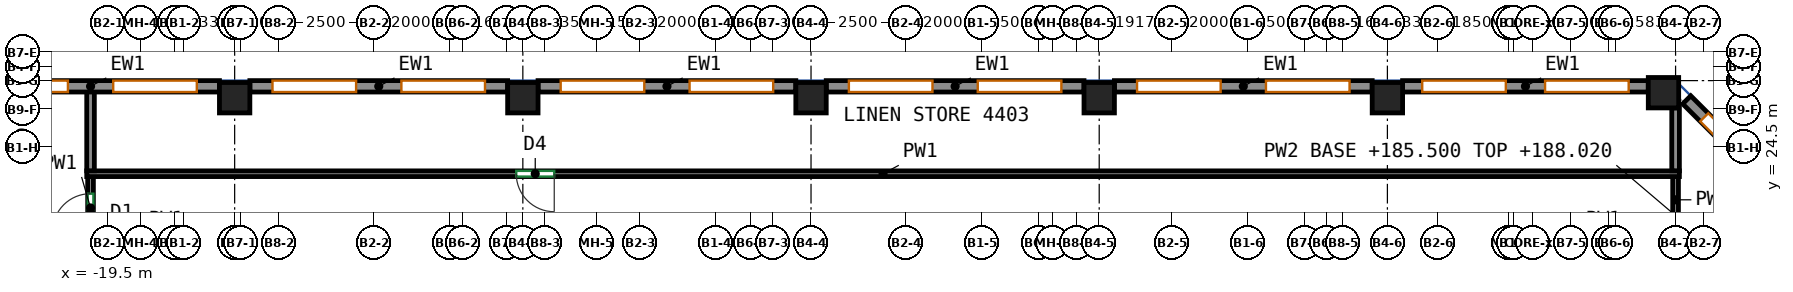
"""IFC4 building model, lengths in metres.
Left out: names, types, materials, properties, quantities, classifications, styles, units other than length and angle.
Written with IfcOpenShell. Run it as: python <this file> out.ifc"""

import sys

from ifc_helpers import new_model, si_unit, direction, frame, frame_2d, origin, origin_2d, place, context, subcontext, project, spatial, rectangle, extrude, source, transform, mapped, element, fill, save


model = new_model("IFC4")
c1 = context("Model", 3, precision=1e-05, world=origin(), true_north=direction((0.0, 1.0)))
c2 = subcontext(c1, "Body", "Model", "MODEL_VIEW")
j1 = project(units=[si_unit("LENGTHUNIT", "METRE"), si_unit("PLANEANGLEUNIT", "RADIAN")], contexts=[c1])
p1 = place(None, origin())
s1 = spatial("IfcSite", under=j1, at=p1, CompositionType="ELEMENT")
p2 = place(p1, origin())
s2 = spatial("IfcBuilding", under=s1, at=p2, CompositionType="ELEMENT")
p3 = place(p2, frame((0.0, 0.0, 185.5)))
s3 = spatial("IfcBuildingStorey", under=s2, at=p3, CompositionType="ELEMENT", Elevation=185.5)
m1 = source(origin(), c2, "Body", "SweptSolid", [
    extrude(rectangle(XDim=0.8, YDim=0.8, at=origin_2d()), origin(), (0.0, 0.0, 1.0), 3.12),
])
for number, where, z_axis, x_axis in (
    (1, (-16.167, 25.8, 0.0), (0.0, 0.0, 1.0), (1.0, 0.0, 0.0)),
    (2, (-8.583, 25.8, 0.0), (0.0, 0.0, 1.0), (1.0, 0.0, 0.0)),
    (3, (-1.0, 25.8, 0.0), (0.0, 0.0, 1.0), (1.0, 0.0, 0.0)),
    (4, (6.583, 25.8, 0.0), (0.0, 0.0, 1.0), (1.0, 0.0, 0.0)),
    (5, (14.167, 25.8, 0.0), (0.0, 0.0, 1.0), (1.0, 0.0, 0.0)),
    (6, (21.432, 25.932, 0.0), (0.0, 0.0, 1.0), (1.0, 0.0, 0.0)),
):
    element("IfcColumn", number, at=place(p3, frame(where, z_axis=z_axis, x_axis=x_axis)), inside=s3, PredefinedType="COLUMN", context=c2, shape_type="MappedRepresentation", body=[
        mapped(m1, transform((0.0, 0.0, 0.0))),
    ])
m2 = source(origin(), c2, "Body", "SweptSolid", [
    extrude(rectangle(XDim=3.5, YDim=0.3, at=frame_2d((1.75, 0.0))), origin(), (0.0, 0.0, 1.0), 3.12),
])
p4 = place(p3, frame((24.519, 23.269, 0.0), z_axis=(0.0, 0.0, 1.0), x_axis=(-0.70707190453, 0.707141656123, 0.0)))
e7 = element("IfcWall", 7, at=p4, inside=s3, PredefinedType="SOLIDWALL", context=c2, shape_type="MappedRepresentation", body=[
    mapped(m2, transform((0.0, 0.0, 0.0))),
])
p5 = place(p4, frame((0.65, 0.0, 0.85)))
e8 = element("IfcOpeningElement", 8, at=p5, cuts=e7, PredefinedType="OPENING", context=c2, shape_type="SweptSolid", body=[
    extrude(rectangle(XDim=2.2, YDim=1.95, at=frame_2d((1.1, 0.975))), frame((0.0, 0.16, 0.0), z_axis=(0.0, -1.0, 0.0), x_axis=(1.0, 0.0, 0.0)), (0.0, 0.0, 1.0), 0.32),
])
m3 = source(origin(), c2, "Body", "SweptSolid", [
    extrude(rectangle(XDim=6.465, YDim=0.3, at=frame_2d((3.232, 0.0))), origin(), (0.0, 0.0, 1.0), 3.12),
])
p6 = place(p3, frame((21.032, 26.1, 0.0), z_axis=(0.0, 0.0, 1.0), x_axis=(-1.0, 0.0, 0.0)))
e9 = element("IfcWall", 9, at=p6, inside=s3, PredefinedType="SOLIDWALL", context=c2, shape_type="MappedRepresentation", body=[
    mapped(m3, transform((0.0, 0.0, 0.0))),
])
p7 = place(p6, frame((0.516, 0.0, 0.85)))
e10 = element("IfcOpeningElement", 10, at=p7, cuts=e9, PredefinedType="OPENING", context=c2, shape_type="SweptSolid", body=[
    extrude(rectangle(XDim=2.2, YDim=1.95, at=frame_2d((1.1, 0.975))), frame((0.0, 0.16, 0.0), z_axis=(0.0, -1.0, 0.0), x_axis=(1.0, 0.0, 0.0)), (0.0, 0.0, 1.0), 0.32),
])
p8 = place(p6, frame((3.749, 0.0, 0.85)))
e11 = element("IfcOpeningElement", 11, at=p8, cuts=e9, PredefinedType="OPENING", context=c2, shape_type="SweptSolid", body=[
    extrude(rectangle(XDim=2.2, YDim=1.95, at=frame_2d((1.1, 0.975))), frame((0.0, 0.16, 0.0), z_axis=(0.0, -1.0, 0.0), x_axis=(1.0, 0.0, 0.0)), (0.0, 0.0, 1.0), 0.32),
])
m4 = source(origin(), c2, "Body", "SweptSolid", [
    extrude(rectangle(XDim=6.783, YDim=0.3, at=frame_2d((3.392, 0.0))), origin(), (0.0, 0.0, 1.0), 3.12),
])
p9 = place(p3, frame((13.767, 26.1, 0.0), z_axis=(0.0, 0.0, 1.0), x_axis=(-1.0, 0.0, 0.0)))
e12 = element("IfcWall", 12, at=p9, inside=s3, PredefinedType="SOLIDWALL", context=c2, shape_type="MappedRepresentation", body=[
    mapped(m4, transform((0.0, 0.0, 0.0))),
])
p10 = place(p9, frame((0.596, 0.0, 0.85)))
e13 = element("IfcOpeningElement", 13, at=p10, cuts=e12, PredefinedType="OPENING", context=c2, shape_type="SweptSolid", body=[
    extrude(rectangle(XDim=2.2, YDim=1.95, at=frame_2d((1.1, 0.975))), frame((0.0, 0.16, 0.0), z_axis=(0.0, -1.0, 0.0), x_axis=(1.0, 0.0, 0.0)), (0.0, 0.0, 1.0), 0.32),
])
p11 = place(p9, frame((3.988, 0.0, 0.85)))
e14 = element("IfcOpeningElement", 14, at=p11, cuts=e12, PredefinedType="OPENING", context=c2, shape_type="SweptSolid", body=[
    extrude(rectangle(XDim=2.2, YDim=1.95, at=frame_2d((1.1, 0.975))), frame((0.0, 0.16, 0.0), z_axis=(0.0, -1.0, 0.0), x_axis=(1.0, 0.0, 0.0)), (0.0, 0.0, 1.0), 0.32),
])
m5 = source(origin(), c2, "Body", "SweptSolid", [
    extrude(rectangle(XDim=6.783, YDim=0.3, at=frame_2d((3.392, 0.0))), origin(), (0.0, 0.0, 1.0), 3.12),
])
p12 = place(p3, frame((6.183, 26.1, 0.0), z_axis=(0.0, 0.0, 1.0), x_axis=(-1.0, 0.0, 0.0)))
e15 = element("IfcWall", 15, at=p12, inside=s3, PredefinedType="SOLIDWALL", context=c2, shape_type="MappedRepresentation", body=[
    mapped(m5, transform((0.0, 0.0, 0.0))),
])
p13 = place(p12, frame((0.596, 0.0, 0.85)))
e16 = element("IfcOpeningElement", 16, at=p13, cuts=e15, PredefinedType="OPENING", context=c2, shape_type="SweptSolid", body=[
    extrude(rectangle(XDim=2.2, YDim=1.95, at=frame_2d((1.1, 0.975))), frame((0.0, 0.16, 0.0), z_axis=(0.0, -1.0, 0.0), x_axis=(1.0, 0.0, 0.0)), (0.0, 0.0, 1.0), 0.32),
])
p14 = place(p12, frame((3.988, 0.0, 0.85)))
e17 = element("IfcOpeningElement", 17, at=p14, cuts=e15, PredefinedType="OPENING", context=c2, shape_type="SweptSolid", body=[
    extrude(rectangle(XDim=2.2, YDim=1.95, at=frame_2d((1.1, 0.975))), frame((0.0, 0.16, 0.0), z_axis=(0.0, -1.0, 0.0), x_axis=(1.0, 0.0, 0.0)), (0.0, 0.0, 1.0), 0.32),
])
p15 = place(p3, frame((-1.4, 26.1, 0.0), z_axis=(0.0, 0.0, 1.0), x_axis=(-1.0, 0.0, 0.0)))
e18 = element("IfcWall", 18, at=p15, inside=s3, PredefinedType="SOLIDWALL", context=c2, shape_type="MappedRepresentation", body=[
    mapped(m5, transform((0.0, 0.0, 0.0))),
])
p16 = place(p15, frame((0.596, 0.0, 0.85)))
e19 = element("IfcOpeningElement", 19, at=p16, cuts=e18, PredefinedType="OPENING", context=c2, shape_type="SweptSolid", body=[
    extrude(rectangle(XDim=2.2, YDim=1.95, at=frame_2d((1.1, 0.975))), frame((0.0, 0.16, 0.0), z_axis=(0.0, -1.0, 0.0), x_axis=(1.0, 0.0, 0.0)), (0.0, 0.0, 1.0), 0.32),
])
p17 = place(p15, frame((3.988, 0.0, 0.85)))
e20 = element("IfcOpeningElement", 20, at=p17, cuts=e18, PredefinedType="OPENING", context=c2, shape_type="SweptSolid", body=[
    extrude(rectangle(XDim=2.2, YDim=1.95, at=frame_2d((1.1, 0.975))), frame((0.0, 0.16, 0.0), z_axis=(0.0, -1.0, 0.0), x_axis=(1.0, 0.0, 0.0)), (0.0, 0.0, 1.0), 0.32),
])
p18 = place(p3, frame((-8.983, 26.1, 0.0), z_axis=(0.0, 0.0, 1.0), x_axis=(-1.0, 0.0, 0.0)))
e21 = element("IfcWall", 21, at=p18, inside=s3, PredefinedType="SOLIDWALL", context=c2, shape_type="MappedRepresentation", body=[
    mapped(m4, transform((0.0, 0.0, 0.0))),
])
p19 = place(p18, frame((0.596, 0.0, 0.85)))
e22 = element("IfcOpeningElement", 22, at=p19, cuts=e21, PredefinedType="OPENING", context=c2, shape_type="SweptSolid", body=[
    extrude(rectangle(XDim=2.2, YDim=1.95, at=frame_2d((1.1, 0.975))), frame((0.0, 0.16, 0.0), z_axis=(0.0, -1.0, 0.0), x_axis=(1.0, 0.0, 0.0)), (0.0, 0.0, 1.0), 0.32),
])
p20 = place(p18, frame((3.988, 0.0, 0.85)))
e23 = element("IfcOpeningElement", 23, at=p20, cuts=e21, PredefinedType="OPENING", context=c2, shape_type="SweptSolid", body=[
    extrude(rectangle(XDim=2.2, YDim=1.95, at=frame_2d((1.1, 0.975))), frame((0.0, 0.16, 0.0), z_axis=(0.0, -1.0, 0.0), x_axis=(1.0, 0.0, 0.0)), (0.0, 0.0, 1.0), 0.32),
])
p21 = place(p3, frame((-16.567, 26.1, 0.0), z_axis=(0.0, 0.0, 1.0), x_axis=(-1.0, 0.0, 0.0)))
e24 = element("IfcWall", 24, at=p21, inside=s3, PredefinedType="SOLIDWALL", context=c2, shape_type="MappedRepresentation", body=[
    mapped(m5, transform((0.0, 0.0, 0.0))),
])
p22 = place(p21, frame((0.596, 0.0, 0.85)))
e25 = element("IfcOpeningElement", 25, at=p22, cuts=e24, PredefinedType="OPENING", context=c2, shape_type="SweptSolid", body=[
    extrude(rectangle(XDim=2.2, YDim=1.95, at=frame_2d((1.1, 0.975))), frame((0.0, 0.16, 0.0), z_axis=(0.0, -1.0, 0.0), x_axis=(1.0, 0.0, 0.0)), (0.0, 0.0, 1.0), 0.32),
])
p23 = place(p21, frame((3.988, 0.0, 0.85)))
e26 = element("IfcOpeningElement", 26, at=p23, cuts=e24, PredefinedType="OPENING", context=c2, shape_type="SweptSolid", body=[
    extrude(rectangle(XDim=2.2, YDim=1.95, at=frame_2d((1.1, 0.975))), frame((0.0, 0.16, 0.0), z_axis=(0.0, -1.0, 0.0), x_axis=(1.0, 0.0, 0.0)), (0.0, 0.0, 1.0), 0.32),
])
p24 = place(p3, frame((-19.959, 22.075, 0.0), z_axis=(0.0, 0.0, 1.0), x_axis=(0.0, 1.0, 0.0)))
e27 = element("IfcWall", 27, at=p24, inside=s3, PredefinedType="PARTITIONING", context=c2, shape_type="SweptSolid", body=[
    extrude(rectangle(XDim=1.65, YDim=0.15, at=frame_2d((0.825, 0.0))), origin(), (0.0, 0.0, 1.0), 3.12),
])
p25 = place(p24, frame((0.2, 0.0, 0.0)))
e28 = element("IfcOpeningElement", 28, at=p25, cuts=e27, PredefinedType="OPENING", context=c2, shape_type="SweptSolid", body=[
    extrude(rectangle(XDim=1.0, YDim=2.1, at=frame_2d((0.5, 1.05))), frame((0.0, 0.085, 0.0), z_axis=(0.0, -1.0, 0.0), x_axis=(1.0, 0.0, 0.0)), (0.0, 0.0, 1.0), 0.17),
])
p26 = place(p3, frame((21.75, 22.503, 0.0), z_axis=(0.0, 0.0, 1.0), x_axis=(0.0, 1.0, 0.0)))
e29 = element("IfcWall", 29, at=p26, inside=s3, PredefinedType="PARTITIONING", context=c2, shape_type="SweptSolid", body=[
    extrude(rectangle(XDim=1.222, YDim=0.15, at=frame_2d((0.611, 0.0))), origin(), (0.0, 0.0, 1.0), 3.12),
])
p27 = place(p3, frame((21.85, 23.8, 0.0), z_axis=(0.0, 0.0, 1.0), x_axis=(-1.0, 0.0, 0.0)))
e30 = element("IfcWall", 30, at=p27, inside=s3, PredefinedType="PARTITIONING", context=c2, shape_type="SweptSolid", body=[
    extrude(rectangle(XDim=41.909, YDim=0.15, at=frame_2d((20.955, 0.0))), origin(), (0.0, 0.0, 1.0), 3.12),
])
p28 = place(p27, frame((29.607, 0.0, 0.0)))
e31 = element("IfcOpeningElement", 31, at=p28, cuts=e30, PredefinedType="OPENING", context=c2, shape_type="SweptSolid", body=[
    extrude(rectangle(XDim=1.0, YDim=2.1, at=frame_2d((0.5, 1.05))), frame((0.0, 0.085, 0.0), z_axis=(0.0, -1.0, 0.0), x_axis=(1.0, 0.0, 0.0)), (0.0, 0.0, 1.0), 0.17),
])
p29 = place(p3, frame((-19.959, 23.877, 0.0), z_axis=(0.0, 0.0, 1.0), x_axis=(0.0, 1.0, 0.0)))
e32 = element("IfcWall", 32, at=p29, inside=s3, PredefinedType="PARTITIONING", context=c2, shape_type="SweptSolid", body=[
    extrude(rectangle(XDim=2.123, YDim=0.2, at=frame_2d((1.062, 0.0))), origin(), (0.0, 0.0, 1.0), 3.12),
])
p30 = place(p3, frame((21.75, 25.532, 0.0), z_axis=(0.0, 0.0, 1.0), x_axis=(0.0, -1.0, 0.0)))
e33 = element("IfcWall", 33, at=p30, inside=s3, PredefinedType="PARTITIONING", context=c2, shape_type="SweptSolid", body=[
    extrude(rectangle(XDim=1.655, YDim=0.2, at=frame_2d((0.828, 0.0))), origin(), (0.0, 0.0, 1.0), 3.12),
])
p31 = place(p5, origin())
e34 = element("IfcWindow", 34, at=p31, inside=s3, PartitioningType="SINGLE_PANEL", PredefinedType="WINDOW", context=c2, shape_type="SweptSolid", body=[
    extrude(rectangle(XDim=2.2, YDim=1.95, at=frame_2d((1.1, 0.975))), frame((0.0, 0.03, 0.0), z_axis=(0.0, -1.0, 0.0), x_axis=(1.0, 0.0, 0.0)), (0.0, 0.0, 1.0), 0.06),
])
fill(e8, e34)
p32 = place(p7, origin())
e35 = element("IfcWindow", 35, at=p32, inside=s3, PartitioningType="SINGLE_PANEL", PredefinedType="WINDOW", context=c2, shape_type="SweptSolid", body=[
    extrude(rectangle(XDim=2.2, YDim=1.95, at=frame_2d((1.1, 0.975))), frame((0.0, 0.03, 0.0), z_axis=(0.0, -1.0, 0.0), x_axis=(1.0, 0.0, 0.0)), (0.0, 0.0, 1.0), 0.06),
])
fill(e10, e35)
p33 = place(p8, origin())
e36 = element("IfcWindow", 36, at=p33, inside=s3, PartitioningType="SINGLE_PANEL", PredefinedType="WINDOW", context=c2, shape_type="SweptSolid", body=[
    extrude(rectangle(XDim=2.2, YDim=1.95, at=frame_2d((1.1, 0.975))), frame((0.0, 0.03, 0.0), z_axis=(0.0, -1.0, 0.0), x_axis=(1.0, 0.0, 0.0)), (0.0, 0.0, 1.0), 0.06),
])
fill(e11, e36)
p34 = place(p10, origin())
e37 = element("IfcWindow", 37, at=p34, inside=s3, PartitioningType="SINGLE_PANEL", PredefinedType="WINDOW", context=c2, shape_type="SweptSolid", body=[
    extrude(rectangle(XDim=2.2, YDim=1.95, at=frame_2d((1.1, 0.975))), frame((0.0, 0.03, 0.0), z_axis=(0.0, -1.0, 0.0), x_axis=(1.0, 0.0, 0.0)), (0.0, 0.0, 1.0), 0.06),
])
fill(e13, e37)
p35 = place(p11, origin())
e38 = element("IfcWindow", 38, at=p35, inside=s3, PartitioningType="SINGLE_PANEL", PredefinedType="WINDOW", context=c2, shape_type="SweptSolid", body=[
    extrude(rectangle(XDim=2.2, YDim=1.95, at=frame_2d((1.1, 0.975))), frame((0.0, 0.03, 0.0), z_axis=(0.0, -1.0, 0.0), x_axis=(1.0, 0.0, 0.0)), (0.0, 0.0, 1.0), 0.06),
])
fill(e14, e38)
p36 = place(p13, origin())
e39 = element("IfcWindow", 39, at=p36, inside=s3, PartitioningType="SINGLE_PANEL", PredefinedType="WINDOW", context=c2, shape_type="SweptSolid", body=[
    extrude(rectangle(XDim=2.2, YDim=1.95, at=frame_2d((1.1, 0.975))), frame((0.0, 0.03, 0.0), z_axis=(0.0, -1.0, 0.0), x_axis=(1.0, 0.0, 0.0)), (0.0, 0.0, 1.0), 0.06),
])
fill(e16, e39)
p37 = place(p14, origin())
e40 = element("IfcWindow", 40, at=p37, inside=s3, PartitioningType="SINGLE_PANEL", PredefinedType="WINDOW", context=c2, shape_type="SweptSolid", body=[
    extrude(rectangle(XDim=2.2, YDim=1.95, at=frame_2d((1.1, 0.975))), frame((0.0, 0.03, 0.0), z_axis=(0.0, -1.0, 0.0), x_axis=(1.0, 0.0, 0.0)), (0.0, 0.0, 1.0), 0.06),
])
fill(e17, e40)
p38 = place(p16, origin())
e41 = element("IfcWindow", 41, at=p38, inside=s3, PartitioningType="SINGLE_PANEL", PredefinedType="WINDOW", context=c2, shape_type="SweptSolid", body=[
    extrude(rectangle(XDim=2.2, YDim=1.95, at=frame_2d((1.1, 0.975))), frame((0.0, 0.03, 0.0), z_axis=(0.0, -1.0, 0.0), x_axis=(1.0, 0.0, 0.0)), (0.0, 0.0, 1.0), 0.06),
])
fill(e19, e41)
p39 = place(p17, origin())
e42 = element("IfcWindow", 42, at=p39, inside=s3, PartitioningType="SINGLE_PANEL", PredefinedType="WINDOW", context=c2, shape_type="SweptSolid", body=[
    extrude(rectangle(XDim=2.2, YDim=1.95, at=frame_2d((1.1, 0.975))), frame((0.0, 0.03, 0.0), z_axis=(0.0, -1.0, 0.0), x_axis=(1.0, 0.0, 0.0)), (0.0, 0.0, 1.0), 0.06),
])
fill(e20, e42)
p40 = place(p19, origin())
e43 = element("IfcWindow", 43, at=p40, inside=s3, PartitioningType="SINGLE_PANEL", PredefinedType="WINDOW", context=c2, shape_type="SweptSolid", body=[
    extrude(rectangle(XDim=2.2, YDim=1.95, at=frame_2d((1.1, 0.975))), frame((0.0, 0.03, 0.0), z_axis=(0.0, -1.0, 0.0), x_axis=(1.0, 0.0, 0.0)), (0.0, 0.0, 1.0), 0.06),
])
fill(e22, e43)
p41 = place(p20, origin())
e44 = element("IfcWindow", 44, at=p41, inside=s3, PartitioningType="SINGLE_PANEL", PredefinedType="WINDOW", context=c2, shape_type="SweptSolid", body=[
    extrude(rectangle(XDim=2.2, YDim=1.95, at=frame_2d((1.1, 0.975))), frame((0.0, 0.03, 0.0), z_axis=(0.0, -1.0, 0.0), x_axis=(1.0, 0.0, 0.0)), (0.0, 0.0, 1.0), 0.06),
])
fill(e23, e44)
p42 = place(p22, origin())
e45 = element("IfcWindow", 45, at=p42, inside=s3, PartitioningType="SINGLE_PANEL", PredefinedType="WINDOW", context=c2, shape_type="SweptSolid", body=[
    extrude(rectangle(XDim=2.2, YDim=1.95, at=frame_2d((1.1, 0.975))), frame((0.0, 0.03, 0.0), z_axis=(0.0, -1.0, 0.0), x_axis=(1.0, 0.0, 0.0)), (0.0, 0.0, 1.0), 0.06),
])
fill(e25, e45)
p43 = place(p23, origin())
e46 = element("IfcWindow", 46, at=p43, inside=s3, PartitioningType="SINGLE_PANEL", PredefinedType="WINDOW", context=c2, shape_type="SweptSolid", body=[
    extrude(rectangle(XDim=2.2, YDim=1.95, at=frame_2d((1.1, 0.975))), frame((0.0, 0.03, 0.0), z_axis=(0.0, -1.0, 0.0), x_axis=(1.0, 0.0, 0.0)), (0.0, 0.0, 1.0), 0.06),
])
fill(e26, e46)
p44 = place(p25, origin())
e47 = element("IfcDoor", 47, at=p44, inside=s3, OperationType="SINGLE_SWING_LEFT", PredefinedType="DOOR", context=c2, shape_type="SweptSolid", body=[
    extrude(rectangle(XDim=1.0, YDim=2.1, at=frame_2d((0.5, 1.05))), frame((0.0, 0.025, 0.0), z_axis=(0.0, -1.0, 0.0), x_axis=(1.0, 0.0, 0.0)), (0.0, 0.0, 1.0), 0.05),
])
fill(e28, e47)
p45 = place(p28, origin())
e48 = element("IfcDoor", 48, at=p45, inside=s3, OperationType="SINGLE_SWING_LEFT", PredefinedType="DOOR", context=c2, shape_type="SweptSolid", body=[
    extrude(rectangle(XDim=1.0, YDim=2.1, at=frame_2d((0.5, 1.05))), frame((0.0, 0.025, 0.0), z_axis=(0.0, -1.0, 0.0), x_axis=(1.0, 0.0, 0.0)), (0.0, 0.0, 1.0), 0.05),
])
fill(e31, e48)
save(model, sys.argv[1])
